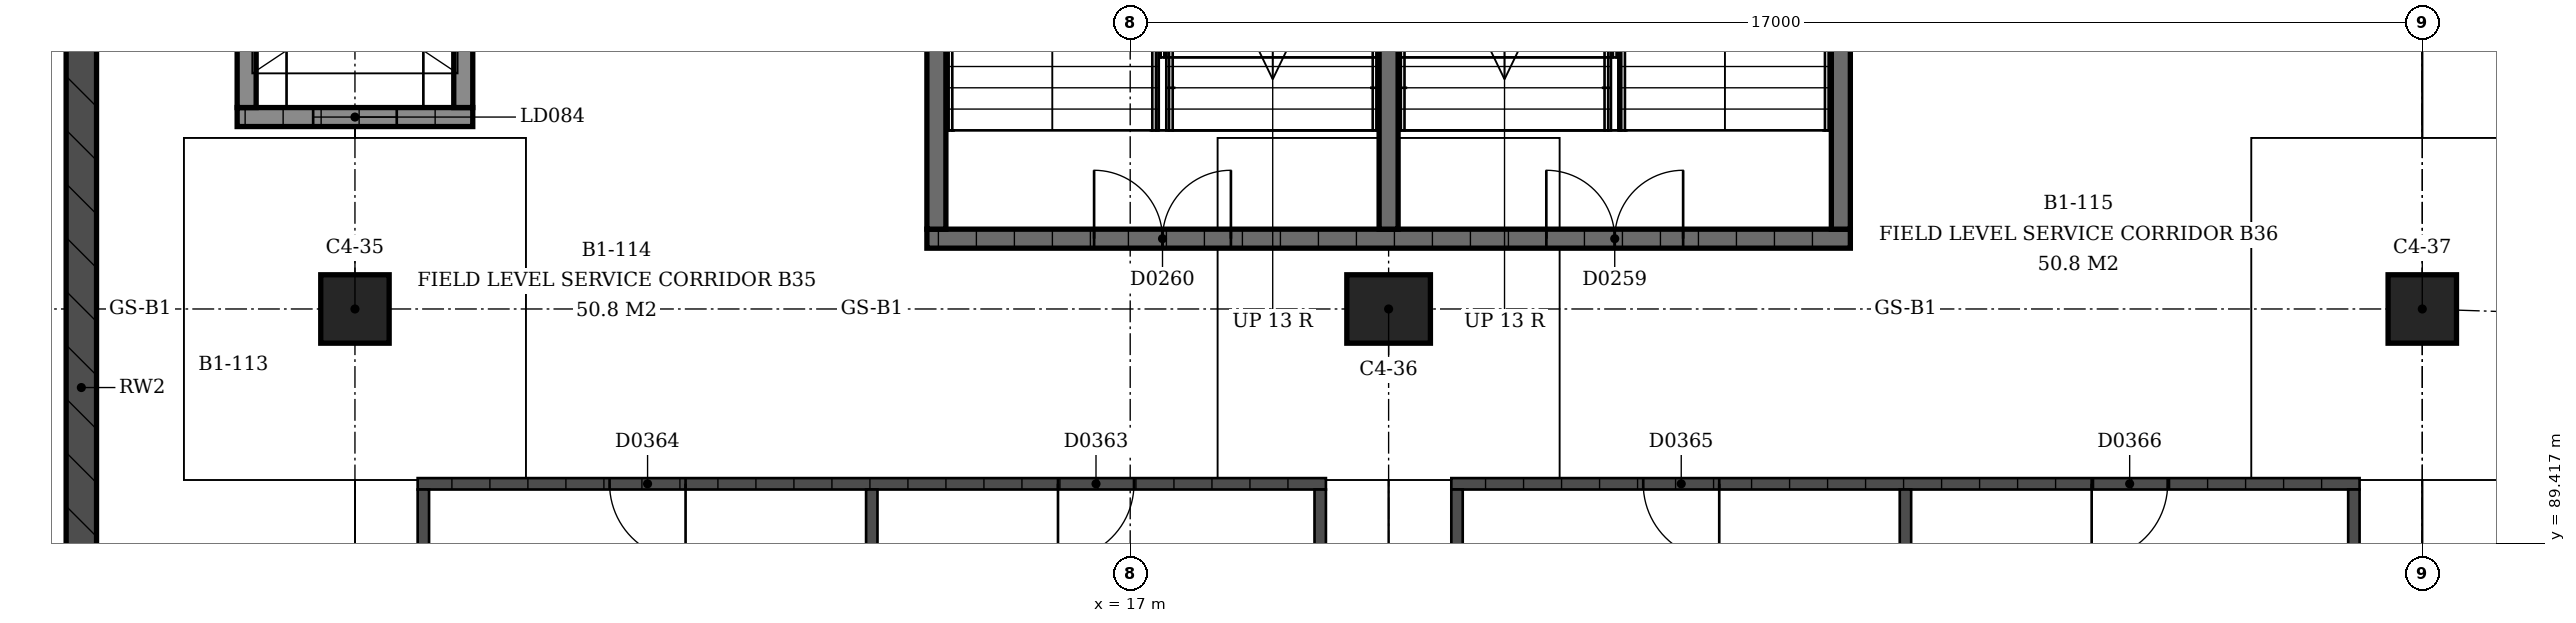
"""IFC4 building model, lengths in metres.
Left out: names, types, materials, properties, quantities, classifications, styles, units other than length and angle.
Written with IfcOpenShell. Run it as: python <this file> out.ifc"""

import sys

from ifc_helpers import new_model, si_unit, direction, frame, frame_2d, origin, origin_2d, place, context, subcontext, project, spatial, rectangle, extrude, element, fill, save


model = new_model("IFC4")
c1 = context("Model", 3, precision=1e-05, world=origin(), true_north=direction((0.0, 1.0)))
c2 = subcontext(c1, "Body", "Model", "MODEL_VIEW")
j1 = project(units=[si_unit("LENGTHUNIT", "METRE"), si_unit("PLANEANGLEUNIT", "RADIAN")], contexts=[c1])
p1 = place(None, origin())
s1 = spatial("IfcSite", under=j1, at=p1, CompositionType="ELEMENT")
p2 = place(p1, origin())
s2 = spatial("IfcBuilding", under=s1, at=p2, CompositionType="ELEMENT")
p3 = place(p2, frame((0.0, 0.0, -4.5)))
s3 = spatial("IfcBuildingStorey", under=s2, at=p3, CompositionType="ELEMENT", Elevation=-4.5)
p4 = place(p3, frame((6.8, 92.5, 0.0), z_axis=(0.0, 0.0, 1.0), x_axis=(-1.0, 0.0, 0.0)))
e1 = element("IfcColumn", 1, at=p4, inside=s3, PredefinedType="COLUMN", context=c2, shape_type="SweptSolid", body=[
    extrude(rectangle(XDim=0.9, YDim=0.9, at=origin_2d()), origin(), (0.0, 0.0, 1.0), 4.5),
])
p5 = place(p3, frame((20.4, 92.5, 0.0), z_axis=(0.0, 0.0, 1.0), x_axis=(-1.0, 0.0, 0.0)))
e2 = element("IfcColumn", 2, at=p5, inside=s3, PredefinedType="COLUMN", context=c2, shape_type="SweptSolid", body=[
    extrude(rectangle(XDim=1.1, YDim=0.9, at=origin_2d()), origin(), (0.0, 0.0, 1.0), 4.5),
])
p6 = place(p3, frame((34.0, 92.5, 0.0), z_axis=(0.0, 0.0, 1.0), x_axis=(-1.0, 0.0, 0.0)))
e3 = element("IfcColumn", 3, at=p6, inside=s3, PredefinedType="COLUMN", context=c2, shape_type="SweptSolid", body=[
    extrude(rectangle(XDim=0.9, YDim=0.9, at=origin_2d()), origin(), (0.0, 0.0, 1.0), 4.5),
])
p7 = place(p3, frame((3.2, 60.0, 0.0), z_axis=(0.0, 0.0, 1.0), x_axis=(0.0, 1.0, 0.0)))
e4 = element("IfcWall", 4, at=p7, inside=s3, PredefinedType="STANDARD", context=c2, shape_type="SweptSolid", body=[
    extrude(rectangle(XDim=42.5, YDim=0.4, at=frame_2d((21.25, 0.0))), origin(), (0.0, 0.0, 1.0), 3.5),
])
p8 = place(p3, frame((26.475, 93.425, 0.0), z_axis=(0.0, 0.0, 1.0), x_axis=(-1.0, 0.0, 0.0)))
e5 = element("IfcWall", 5, at=p8, inside=s3, PredefinedType="SHEAR", context=c2, shape_type="SweptSolid", body=[
    extrude(rectangle(XDim=12.15, YDim=0.25, at=frame_2d((6.075, 0.0))), origin(), (0.0, 0.0, 1.0), 4.09),
])
p9 = place(p8, frame((2.2, 0.0, 0.0)))
e6 = element("IfcOpeningElement", 6, at=p9, cuts=e5, PredefinedType="OPENING", context=c2, shape_type="SweptSolid", body=[
    extrude(rectangle(XDim=1.8, YDim=2.1, at=frame_2d((0.9, 1.05))), frame((0.0, 0.125, 0.0), z_axis=(0.0, -1.0, 0.0), x_axis=(1.0, 0.0, 0.0)), (0.0, 0.0, 1.0), 0.25),
])
p10 = place(p8, frame((8.15, 0.0, 0.0)))
e7 = element("IfcOpeningElement", 7, at=p10, cuts=e5, PredefinedType="OPENING", context=c2, shape_type="SweptSolid", body=[
    extrude(rectangle(XDim=1.8, YDim=2.1, at=frame_2d((0.9, 1.05))), frame((0.0, 0.125, 0.0), z_axis=(0.0, -1.0, 0.0), x_axis=(1.0, 0.0, 0.0)), (0.0, 0.0, 1.0), 0.25),
])
for number, where, z_axis, x_axis in (
    (8, (26.35, 93.55, 0.0), (0.0, 0.0, 1.0), (0.0, 1.0, 0.0)),
    (9, (14.45, 93.55, 0.0), (0.0, 0.0, 1.0), (0.0, 1.0, 0.0)),
    (10, (20.4, 93.55, 0.0), (0.0, 0.0, 1.0), (0.0, 1.0, 0.0)),
):
    element("IfcWall", number, at=place(p3, frame(where, z_axis=z_axis, x_axis=x_axis)), inside=s3, PredefinedType="SHEAR", context=c2, shape_type="SweptSolid", body=[
        extrude(rectangle(XDim=7.46, YDim=0.25, at=frame_2d((3.73, 0.0))), origin(), (0.0, 0.0, 1.0), 4.09),
    ])
p11 = place(p3, frame((8.35, 95.025, -1.2), z_axis=(0.0, 0.0, 1.0), x_axis=(-1.0, 0.0, 0.0)))
e11 = element("IfcWall", 11, at=p11, inside=s3, PredefinedType="SHEAR", context=c2, shape_type="SweptSolid", body=[
    extrude(rectangle(XDim=3.1, YDim=0.25, at=frame_2d((1.55, 0.0))), origin(), (0.0, 0.0, 1.0), 5.29),
])
p12 = place(p11, frame((1.0, 0.0, 1.2)))
e12 = element("IfcOpeningElement", 12, at=p12, cuts=e11, PredefinedType="OPENING", context=c2, shape_type="SweptSolid", body=[
    extrude(rectangle(XDim=1.1, YDim=2.1, at=frame_2d((0.55, 1.05))), frame((0.0, 0.125, 0.0), z_axis=(0.0, -1.0, 0.0), x_axis=(1.0, 0.0, 0.0)), (0.0, 0.0, 1.0), 0.25),
])
for number, where, z_axis, x_axis in (
    (13, (8.225, 95.15, -1.2), (0.0, 0.0, 1.0), (0.0, 1.0, 0.0)),
    (14, (5.375, 95.15, -1.2), (0.0, 0.0, 1.0), (0.0, 1.0, 0.0)),
):
    element("IfcWall", number, at=place(p3, frame(where, z_axis=z_axis, x_axis=x_axis)), inside=s3, PredefinedType="SHEAR", context=c2, shape_type="SweptSolid", body=[
        extrude(rectangle(XDim=3.4, YDim=0.25, at=frame_2d((1.7, 0.0))), origin(), (0.0, 0.0, 1.0), 5.29),
    ])
p13 = place(p3, frame((19.575, 90.2, 0.0), z_axis=(0.0, 0.0, 1.0), x_axis=(-1.0, 0.0, 0.0)))
e15 = element("IfcWall", 15, at=p13, inside=s3, PredefinedType="SOLIDWALL", context=c2, shape_type="SweptSolid", body=[
    extrude(rectangle(XDim=11.95, YDim=0.15, at=frame_2d((5.975, 0.0))), origin(), (0.0, 0.0, 1.0), 3.0),
])
p14 = place(p13, frame((2.525, 0.0, 0.0)))
e16 = element("IfcOpeningElement", 16, at=p14, cuts=e15, PredefinedType="OPENING", context=c2, shape_type="SweptSolid", body=[
    extrude(rectangle(XDim=1.0, YDim=2.1, at=frame_2d((0.5, 1.05))), frame((0.0, 0.075, 0.0), z_axis=(0.0, -1.0, 0.0), x_axis=(1.0, 0.0, 0.0)), (0.0, 0.0, 1.0), 0.15),
])
p15 = place(p13, frame((8.425, 0.0, 0.0)))
e17 = element("IfcOpeningElement", 17, at=p15, cuts=e15, PredefinedType="OPENING", context=c2, shape_type="SweptSolid", body=[
    extrude(rectangle(XDim=1.0, YDim=2.1, at=frame_2d((0.5, 1.05))), frame((0.0, 0.075, 0.0), z_axis=(0.0, -1.0, 0.0), x_axis=(1.0, 0.0, 0.0)), (0.0, 0.0, 1.0), 0.15),
])
for number, where, z_axis, x_axis in (
    (18, (19.5, 80.575, 0.0), (0.0, 0.0, 1.0), (0.0, 1.0, 0.0)),
    (19, (13.6, 80.575, 0.0), (0.0, 0.0, 1.0), (0.0, 1.0, 0.0)),
    (20, (7.7, 80.575, 0.0), (0.0, 0.0, 1.0), (0.0, 1.0, 0.0)),
):
    element("IfcWall", number, at=place(p3, frame(where, z_axis=z_axis, x_axis=x_axis)), inside=s3, PredefinedType="SOLIDWALL", context=c2, shape_type="SweptSolid", body=[
        extrude(rectangle(XDim=9.55, YDim=0.15, at=frame_2d((4.775, 0.0))), origin(), (0.0, 0.0, 1.0), 3.0),
    ])
p16 = place(p3, frame((21.225, 90.2, 0.0), z_axis=(0.0, 0.0, 1.0), x_axis=(1.0, 0.0, 0.0)))
e21 = element("IfcWall", 21, at=p16, inside=s3, PredefinedType="SOLIDWALL", context=c2, shape_type="SweptSolid", body=[
    extrude(rectangle(XDim=11.95, YDim=0.15, at=frame_2d((5.975, 0.0))), origin(), (0.0, 0.0, 1.0), 3.0),
])
p17 = place(p16, frame((2.525, 0.0, 0.0)))
e22 = element("IfcOpeningElement", 22, at=p17, cuts=e21, PredefinedType="OPENING", context=c2, shape_type="SweptSolid", body=[
    extrude(rectangle(XDim=1.0, YDim=2.1, at=frame_2d((0.5, 1.05))), frame((0.0, 0.075, 0.0), z_axis=(0.0, -1.0, 0.0), x_axis=(1.0, 0.0, 0.0)), (0.0, 0.0, 1.0), 0.15),
])
p18 = place(p16, frame((8.425, 0.0, 0.0)))
e23 = element("IfcOpeningElement", 23, at=p18, cuts=e21, PredefinedType="OPENING", context=c2, shape_type="SweptSolid", body=[
    extrude(rectangle(XDim=1.0, YDim=2.1, at=frame_2d((0.5, 1.05))), frame((0.0, 0.075, 0.0), z_axis=(0.0, -1.0, 0.0), x_axis=(1.0, 0.0, 0.0)), (0.0, 0.0, 1.0), 0.15),
])
for number, where, z_axis, x_axis in (
    (24, (21.3, 80.575, 0.0), (0.0, 0.0, 1.0), (0.0, 1.0, 0.0)),
    (25, (27.2, 80.575, 0.0), (0.0, 0.0, 1.0), (0.0, 1.0, 0.0)),
    (26, (33.1, 80.575, 0.0), (0.0, 0.0, 1.0), (0.0, 1.0, 0.0)),
):
    element("IfcWall", number, at=place(p3, frame(where, z_axis=z_axis, x_axis=x_axis)), inside=s3, PredefinedType="SOLIDWALL", context=c2, shape_type="SweptSolid", body=[
        extrude(rectangle(XDim=9.55, YDim=0.15, at=frame_2d((4.775, 0.0))), origin(), (0.0, 0.0, 1.0), 3.0),
    ])
p19 = place(p3, frame((35.032, 80.37, 0.0), z_axis=(0.0, 0.0, 1.0), x_axis=(0.037006901301, 0.999315010022, 0.0)))
e27 = element("IfcWall", 27, at=p19, inside=s3, PredefinedType="SOLIDWALL", context=c2, shape_type="SweptSolid", body=[
    extrude(rectangle(XDim=9.487, YDim=0.15, at=frame_2d((4.743, 0.0))), origin(), (0.0, 0.0, 1.0), 3.0),
])
p20 = place(p9, origin())
e28 = element("IfcDoor", 28, at=p20, inside=s3, OperationType="DOUBLE_DOOR_SINGLE_SWING", PredefinedType="DOOR", context=c2, shape_type="SweptSolid", body=[
    extrude(rectangle(XDim=1.8, YDim=2.1, at=frame_2d((0.9, 1.05))), frame((0.0, 0.025, 0.0), z_axis=(0.0, -1.0, 0.0), x_axis=(1.0, 0.0, 0.0)), (0.0, 0.0, 1.0), 0.05),
])
fill(e6, e28)
p21 = place(p10, origin())
e29 = element("IfcDoor", 29, at=p21, inside=s3, OperationType="DOUBLE_DOOR_SINGLE_SWING", PredefinedType="DOOR", context=c2, shape_type="SweptSolid", body=[
    extrude(rectangle(XDim=1.8, YDim=2.1, at=frame_2d((0.9, 1.05))), frame((0.0, 0.025, 0.0), z_axis=(0.0, -1.0, 0.0), x_axis=(1.0, 0.0, 0.0)), (0.0, 0.0, 1.0), 0.05),
])
fill(e7, e29)
p22 = place(p12, origin())
e30 = element("IfcDoor", 30, at=p22, inside=s3, OperationType="SLIDING_TO_LEFT", PredefinedType="DOOR", context=c2, shape_type="SweptSolid", body=[
    extrude(rectangle(XDim=1.1, YDim=2.1, at=frame_2d((0.55, 1.05))), frame((0.0, 0.025, 0.0), z_axis=(0.0, -1.0, 0.0), x_axis=(1.0, 0.0, 0.0)), (0.0, 0.0, 1.0), 0.05),
])
fill(e12, e30)
p23 = place(p14, origin())
e31 = element("IfcDoor", 31, at=p23, inside=s3, OperationType="SINGLE_SWING_LEFT", PredefinedType="DOOR", context=c2, shape_type="SweptSolid", body=[
    extrude(rectangle(XDim=1.0, YDim=2.1, at=frame_2d((0.5, 1.05))), frame((0.0, 0.025, 0.0), z_axis=(0.0, -1.0, 0.0), x_axis=(1.0, 0.0, 0.0)), (0.0, 0.0, 1.0), 0.05),
])
fill(e16, e31)
p24 = place(p15, origin())
e32 = element("IfcDoor", 32, at=p24, inside=s3, OperationType="SINGLE_SWING_RIGHT", PredefinedType="DOOR", context=c2, shape_type="SweptSolid", body=[
    extrude(rectangle(XDim=1.0, YDim=2.1, at=frame_2d((0.5, 1.05))), frame((0.0, 0.025, 0.0), z_axis=(0.0, -1.0, 0.0), x_axis=(1.0, 0.0, 0.0)), (0.0, 0.0, 1.0), 0.05),
])
fill(e17, e32)
p25 = place(p17, origin())
e33 = element("IfcDoor", 33, at=p25, inside=s3, OperationType="SINGLE_SWING_RIGHT", PredefinedType="DOOR", context=c2, shape_type="SweptSolid", body=[
    extrude(rectangle(XDim=1.0, YDim=2.1, at=frame_2d((0.5, 1.05))), frame((0.0, 0.025, 0.0), z_axis=(0.0, -1.0, 0.0), x_axis=(1.0, 0.0, 0.0)), (0.0, 0.0, 1.0), 0.05),
])
fill(e22, e33)
p26 = place(p18, origin())
e34 = element("IfcDoor", 34, at=p26, inside=s3, OperationType="SINGLE_SWING_LEFT", PredefinedType="DOOR", context=c2, shape_type="SweptSolid", body=[
    extrude(rectangle(XDim=1.0, YDim=2.1, at=frame_2d((0.5, 1.05))), frame((0.0, 0.025, 0.0), z_axis=(0.0, -1.0, 0.0), x_axis=(1.0, 0.0, 0.0)), (0.0, 0.0, 1.0), 0.05),
])
fill(e23, e34)
save(model, sys.argv[1])
